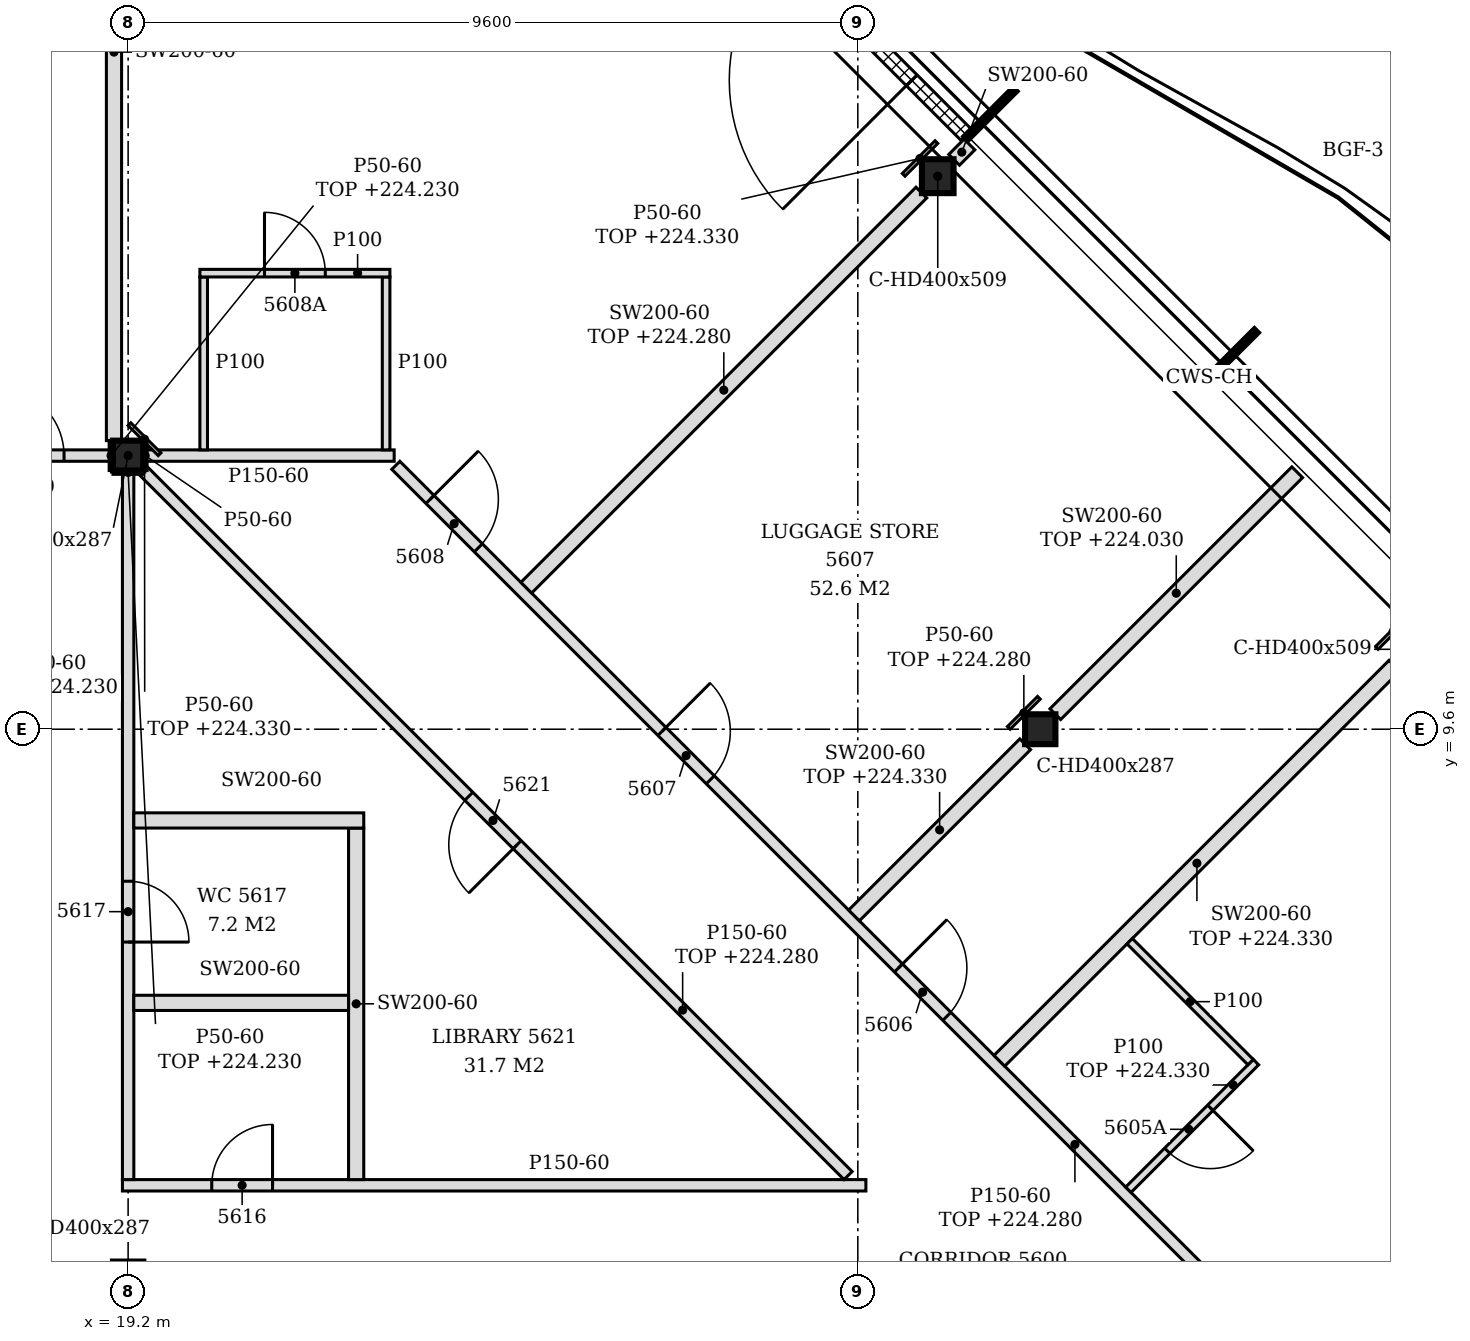
"""IFC4 building model, lengths in metres.
Left out: names, types, materials, properties, quantities, classifications, styles, units other than length and angle.
Written with IfcOpenShell. Run it as: python <this file> out.ifc"""

import sys

from ifc_helpers import new_model, si_unit, direction, frame, frame_2d, origin, origin_2d, place, context, subcontext, project, spatial, polyline, rectangle, i_section, outline, extrude, element, fill, save


model = new_model("IFC4")
c1 = context("Model", 3, precision=1e-05, world=origin(), true_north=direction((0.0, 1.0)))
c2 = subcontext(c1, "Body", "Model", "MODEL_VIEW")
j1 = project(units=[si_unit("LENGTHUNIT", "METRE"), si_unit("PLANEANGLEUNIT", "RADIAN")], contexts=[c1])
p1 = place(None, origin())
s1 = spatial("IfcSite", under=j1, at=p1, CompositionType="ELEMENT")
p2 = place(p1, origin())
s2 = spatial("IfcBuilding", under=s1, at=p2, CompositionType="ELEMENT")
p3 = place(p2, frame((0.0, 0.0, 221.4)))
s3 = spatial("IfcBuildingStorey", under=s2, at=p3, CompositionType="ELEMENT", Elevation=221.4)
p4 = place(p3, frame((29.852, 16.876, -0.15), z_axis=(0.0, 0.0, 1.0), x_axis=(1.0, 0.0, 0.0)))
e1 = element("IfcColumn", 1, at=p4, inside=s3, PredefinedType="COLUMN", context=c2, shape_type="SweptSolid", body=[
    extrude(i_section(OverallWidth=0.416, OverallDepth=0.446, WebThickness=0.039, FlangeThickness=0.063, FilletRadius=0.015, at=origin_2d()), origin(), (0.0, 0.0, 1.0), 3.6),
])
for number, where, z_axis, x_axis in (
    (2, (19.2, 13.2, -0.15), (0.0, 0.0, 1.0), (1.0, 0.0, 0.0)),
    (3, (31.2, 9.6, -0.15), (0.0, 0.0, 1.0), (1.0, 0.0, 0.0)),
):
    element("IfcColumn", number, at=place(p3, frame(where, z_axis=z_axis, x_axis=x_axis)), inside=s3, PredefinedType="COLUMN", context=c2, shape_type="SweptSolid", body=[
        extrude(i_section(OverallWidth=0.399, OverallDepth=0.393, WebThickness=0.023, FlangeThickness=0.037, FilletRadius=0.015, at=origin_2d()), origin(), (0.0, 0.0, 1.0), 3.6),
    ])
p5 = place(p3, frame((30.226, 17.42, 0.0), z_axis=(0.0, 0.0, 1.0), x_axis=(-0.707079231393, 0.707134329907, 0.0)))
e4 = element("IfcWall", 4, at=p5, inside=s3, PredefinedType="NOTDEFINED", context=c2, shape_type="SweptSolid", body=[
    extrude(rectangle(XDim=4.431, YDim=0.2, at=frame_2d((2.215, 0.0))), origin(), (0.0, 0.0, 1.0), 3.45),
])
p6 = place(p5, frame((1.015, 0.0, 0.0)))
e5 = element("IfcOpeningElement", 5, at=p6, cuts=e4, PredefinedType="OPENING", context=c2, shape_type="SweptSolid", body=[
    extrude(rectangle(XDim=2.4, YDim=2.4, at=frame_2d((1.2, 1.2))), frame((0.0, 0.11, 0.0), z_axis=(0.0, -1.0, 0.0), x_axis=(1.0, 0.0, 0.0)), (0.0, 0.0, 1.0), 0.22),
])
p7 = place(p3, frame((33.341, 2.453, 0.0), z_axis=(0.0, 0.0, 1.0), x_axis=(-0.707098652635, 0.707114909645, 0.0)))
e6 = element("IfcWall", 6, at=p7, inside=s3, PredefinedType="PARTITIONING", context=c2, shape_type="SweptSolid", body=[
    extrude(rectangle(XDim=15.018, YDim=0.15, at=frame_2d((7.509, 0.0))), origin(), (0.0, 0.0, 1.0), 2.88),
])
p8 = place(p7, frame((4.766, 0.0, 0.0)))
e7 = element("IfcOpeningElement", 7, at=p8, cuts=e6, PredefinedType="OPENING", context=c2, shape_type="SweptSolid", body=[
    extrude(rectangle(XDim=0.9, YDim=2.1, at=frame_2d((0.45, 1.05))), frame((0.0, 0.085, 0.0), z_axis=(0.0, -1.0, 0.0), x_axis=(1.0, 0.0, 0.0)), (0.0, 0.0, 1.0), 0.17),
])
p9 = place(p7, frame((9.167, 0.0, 0.0)))
e8 = element("IfcOpeningElement", 8, at=p9, cuts=e6, PredefinedType="OPENING", context=c2, shape_type="SweptSolid", body=[
    extrude(rectangle(XDim=0.9, YDim=2.1, at=frame_2d((0.45, 1.05))), frame((0.0, 0.085, 0.0), z_axis=(0.0, -1.0, 0.0), x_axis=(1.0, 0.0, 0.0)), (0.0, 0.0, 1.0), 0.17),
])
p10 = place(p7, frame((13.482, 0.0, 0.0)))
e9 = element("IfcOpeningElement", 9, at=p10, cuts=e6, PredefinedType="OPENING", context=c2, shape_type="SweptSolid", body=[
    extrude(rectangle(XDim=0.9, YDim=2.1, at=frame_2d((0.45, 1.05))), frame((0.0, 0.085, 0.0), z_axis=(0.0, -1.0, 0.0), x_axis=(1.0, 0.0, 0.0)), (0.0, 0.0, 1.0), 0.17),
])
p11 = place(p3, frame((32.359, 3.541, 0.0), z_axis=(0.0, 0.0, 1.0), x_axis=(0.707158179099, 0.707055379538, 0.0)))
e10 = element("IfcWall", 10, at=p11, inside=s3, PredefinedType="PARTITIONING", context=c2, shape_type="SweptSolid", body=[
    extrude(rectangle(XDim=2.375, YDim=0.1, at=frame_2d((1.188, 0.0))), origin(), (0.0, 0.0, 1.0), 2.93),
])
p12 = place(p11, frame((0.725, 0.0, 0.0)))
e11 = element("IfcOpeningElement", 11, at=p12, cuts=e10, PredefinedType="OPENING", context=c2, shape_type="SweptSolid", body=[
    extrude(rectangle(XDim=0.8, YDim=2.1, at=frame_2d((0.4, 1.05))), frame((0.0, 0.06, 0.0), z_axis=(0.0, -1.0, 0.0), x_axis=(1.0, 0.0, 0.0)), (0.0, 0.0, 1.0), 0.12),
])
p13 = place(p3, frame((19.125, 3.6, 0.0), z_axis=(0.0, 0.0, 1.0), x_axis=(1.0, 0.0, 0.0)))
e12 = element("IfcWall", 12, at=p13, inside=s3, PredefinedType="PARTITIONING", context=c2, shape_type="SweptSolid", body=[
    extrude(outline(polyline([(0.0, 0.0), (9.781, 0.0), (9.781, 3.45), (0.225, 3.45), (0.223, 2.83), (0.0, 2.83), (0.0, 0.0)])), frame((0.0, 0.075, 0.0), z_axis=(0.0, -1.0, 0.0), x_axis=(1.0, 0.0, 0.0)), (0.0, 0.0, 1.0), 0.15),
])
p14 = place(p13, frame((1.175, 0.0, 0.0)))
e13 = element("IfcOpeningElement", 13, at=p14, cuts=e12, PredefinedType="OPENING", context=c2, shape_type="SweptSolid", body=[
    extrude(rectangle(XDim=0.8, YDim=2.1, at=frame_2d((0.4, 1.05))), frame((0.0, 0.085, 0.0), z_axis=(0.0, -1.0, 0.0), x_axis=(1.0, 0.0, 0.0)), (0.0, 0.0, 1.0), 0.17),
])
p15 = place(p3, frame((19.2, 3.675, 0.0), z_axis=(0.0, 0.0, 1.0), x_axis=(0.0, 1.0, 0.0)))
e14 = element("IfcWall", 14, at=p15, inside=s3, PredefinedType="PARTITIONING", context=c2, shape_type="SweptSolid", body=[
    extrude(rectangle(XDim=9.328, YDim=0.15, at=frame_2d((4.664, 0.0))), origin(), (0.0, 0.0, 1.0), 2.83),
])
p16 = place(p15, frame((3.125, 0.0, 0.0)))
e15 = element("IfcOpeningElement", 15, at=p16, cuts=e14, PredefinedType="OPENING", context=c2, shape_type="SweptSolid", body=[
    extrude(rectangle(XDim=0.8, YDim=2.1, at=frame_2d((0.4, 1.05))), frame((0.0, 0.085, 0.0), z_axis=(0.0, -1.0, 0.0), x_axis=(1.0, 0.0, 0.0)), (0.0, 0.0, 1.0), 0.17),
])
p17 = place(p3, frame((22.2, 3.675, 0.0), z_axis=(0.0, 0.0, 1.0), x_axis=(0.0, 1.0, 0.0)))
e16 = element("IfcWall", 16, at=p17, inside=s3, PredefinedType="PARTITIONING", context=c2, shape_type="SweptSolid", body=[
    extrude(outline(polyline([(0.0, 0.0), (4.625, 0.0), (4.625, 3.45), (1.23, 3.45), (1.228, 2.88), (1.02, 2.88), (1.018, 3.45), (0.0, 3.45), (0.0, 0.0)])), frame((0.0, 0.1, 0.0), z_axis=(0.0, -1.0, 0.0), x_axis=(1.0, 0.0, 0.0)), (0.0, 0.0, 1.0), 0.2),
])
p18 = place(p3, frame((28.672, 3.728, 0.0), z_axis=(0.0, 0.0, 1.0), x_axis=(-0.707116088468, 0.707097473782, 0.0)))
e17 = element("IfcWall", 17, at=p18, inside=s3, PredefinedType="PARTITIONING", context=c2, shape_type="SweptSolid", body=[
    extrude(rectangle(XDim=13.115, YDim=0.15, at=frame_2d((6.558, 0.0))), origin(), (0.0, 0.0, 1.0), 2.88),
])
p19 = place(p18, frame((6.157, 0.0, 0.0)))
e18 = element("IfcOpeningElement", 18, at=p19, cuts=e17, PredefinedType="OPENING", context=c2, shape_type="SweptSolid", body=[
    extrude(rectangle(XDim=0.9, YDim=2.1, at=frame_2d((0.45, 1.05))), frame((0.0, 0.085, 0.0), z_axis=(0.0, -1.0, 0.0), x_axis=(1.0, 0.0, 0.0)), (0.0, 0.0, 1.0), 0.17),
])
p20 = place(p3, frame((30.662, 5.238, 0.0), z_axis=(0.0, 0.0, 1.0), x_axis=(0.707106781187, 0.707106781187, 0.0)))
e19 = element("IfcWall", 19, at=p20, inside=s3, PredefinedType="PARTITIONING", context=c2, shape_type="SweptSolid", body=[
    extrude(rectangle(XDim=7.351, YDim=0.2, at=frame_2d((3.676, 0.0))), origin(), (0.0, 0.0, 1.0), 2.93),
])
p21 = place(p3, frame((33.968, 5.22, 0.0), z_axis=(0.0, 0.0, 1.0), x_axis=(-0.707106781187, 0.707106781187, 0.0)))
e20 = element("IfcWall", 20, at=p21, inside=s3, PredefinedType="PARTITIONING", context=c2, shape_type="SweptSolid", body=[
    extrude(rectangle(XDim=2.25, YDim=0.1, at=frame_2d((1.125, 0.0))), origin(), (0.0, 0.0, 1.0), 3.45),
])
p22 = place(p3, frame((19.275, 6.0, 0.0), z_axis=(0.0, 0.0, 1.0), x_axis=(1.0, 0.0, 0.0)))
e21 = element("IfcWall", 21, at=p22, inside=s3, PredefinedType="PARTITIONING", context=c2, shape_type="SweptSolid", body=[
    extrude(outline(polyline([(0.0, 0.0), (2.825, 0.0), (2.825, 3.45), (0.075, 3.45), (0.073, 2.83), (0.0, 2.83), (0.0, 0.0)])), frame((0.0, 0.1, 0.0), z_axis=(0.0, -1.0, 0.0), x_axis=(1.0, 0.0, 0.0)), (0.0, 0.0, 1.0), 0.2),
])
p23 = place(p3, frame((28.75, 7.15, 0.0), z_axis=(0.0, 0.0, 1.0), x_axis=(0.7070684525, 0.707145107796, 0.0)))
e22 = element("IfcWall", 22, at=p23, inside=s3, PredefinedType="PARTITIONING", context=c2, shape_type="SweptSolid", body=[
    extrude(rectangle(XDim=3.185, YDim=0.2, at=frame_2d((1.592, 0.0))), origin(), (0.0, 0.0, 1.0), 2.93),
])
p24 = place(p3, frame((19.275, 8.4, 0.0), z_axis=(0.0, 0.0, 1.0), x_axis=(1.0, 0.0, 0.0)))
e23 = element("IfcWall", 23, at=p24, inside=s3, PredefinedType="PARTITIONING", context=c2, shape_type="SweptSolid", body=[
    extrude(outline(polyline([(0.0, 0.0), (3.025, 0.0), (3.025, 3.45), (0.075, 3.45), (0.073, 2.83), (0.0, 2.83), (0.0, 0.0)])), frame((0.0, 0.1, 0.0), z_axis=(0.0, -1.0, 0.0), x_axis=(1.0, 0.0, 0.0)), (0.0, 0.0, 1.0), 0.2),
])
p25 = place(p3, frame((31.398, 9.798, 0.0), z_axis=(0.0, 0.0, 1.0), x_axis=(0.707133900936, 0.707079660397, 0.0)))
e24 = element("IfcWall", 24, at=p25, inside=s3, PredefinedType="PARTITIONING", context=c2, shape_type="SweptSolid", body=[
    extrude(rectangle(XDim=4.501, YDim=0.2, at=frame_2d((2.25, 0.0))), origin(), (0.0, 0.0, 1.0), 2.63),
])
p26 = place(p3, frame((24.438, 11.462, 0.0), z_axis=(0.0, 0.0, 1.0), x_axis=(0.707090175614, 0.707123386369, 0.0)))
e25 = element("IfcWall", 25, at=p26, inside=s3, PredefinedType="PARTITIONING", context=c2, shape_type="SweptSolid", body=[
    extrude(rectangle(XDim=7.351, YDim=0.2, at=frame_2d((3.676, 0.0))), origin(), (0.0, 0.0, 1.0), 2.88),
])
p27 = place(p3, frame((7.399, 13.2, 0.0), z_axis=(0.0, 0.0, 1.0), x_axis=(1.0, 0.0, 0.0)))
e26 = element("IfcWall", 26, at=p27, inside=s3, PredefinedType="PARTITIONING", context=c2, shape_type="SweptSolid", body=[
    extrude(rectangle(XDim=11.601, YDim=0.15, at=frame_2d((5.801, 0.0))), origin(), (0.0, 0.0, 1.0), 2.83),
])
p28 = place(p27, frame((10.058, 0.0, 0.0)))
e27 = element("IfcOpeningElement", 27, at=p28, cuts=e26, PredefinedType="OPENING", context=c2, shape_type="SweptSolid", body=[
    extrude(rectangle(XDim=0.9, YDim=2.1, at=frame_2d((0.45, 1.05))), frame((0.0, 0.085, 0.0), z_axis=(0.0, -1.0, 0.0), x_axis=(1.0, 0.0, 0.0)), (0.0, 0.0, 1.0), 0.17),
])
p29 = place(p3, frame((19.399, 13.2, 0.0), z_axis=(0.0, 0.0, 1.0), x_axis=(1.0, 0.0, 0.0)))
e28 = element("IfcWall", 28, at=p29, inside=s3, PredefinedType="PARTITIONING", context=c2, shape_type="SweptSolid", body=[
    extrude(rectangle(XDim=3.301, YDim=0.15, at=frame_2d((1.65, 0.0))), origin(), (0.0, 0.0, 1.0), 3.45),
])
for number, where, z_axis, x_axis in (
    (29, (20.194, 13.275, 0.0), (0.0, 0.0, 1.0), (0.0, 1.0, 0.0)),
    (30, (22.594, 13.275, 0.0), (0.0, 0.0, 1.0), (0.0, 1.0, 0.0)),
):
    element("IfcWall", number, at=place(p3, frame(where, z_axis=z_axis, x_axis=x_axis)), inside=s3, PredefinedType="PARTITIONING", context=c2, shape_type="SweptSolid", body=[
        extrude(outline(polyline([(0.0, 0.0), (2.275, 0.0), (2.275, 3.45), (1.23, 3.45), (1.228, 2.88), (1.02, 2.88), (1.018, 3.45), (0.0, 3.45), (0.0, 0.0)])), frame((0.0, 0.05, 0.0), z_axis=(0.0, -1.0, 0.0), x_axis=(1.0, 0.0, 0.0)), (0.0, 0.0, 1.0), 0.1),
    ])
p30 = place(p3, frame((19.014, 13.396, 0.0), z_axis=(0.0, 0.0, 1.0), x_axis=(0.0, 1.0, 0.0)))
e31 = element("IfcWall", 31, at=p30, inside=s3, PredefinedType="PARTITIONING", context=c2, shape_type="SweptSolid", body=[
    extrude(outline(polyline([(0.0, 0.0), (10.224, 0.0), (10.223, 3.45), (9.854, 3.45), (9.852, 2.93), (5.908, 2.93), (5.906, 2.88), (5.698, 2.88), (5.697, 2.93), (0.003, 2.93), (0.001, 3.45), (0.0, 3.45), (0.0, 0.0)])), frame((0.0, 0.1, 0.0), z_axis=(0.0, -1.0, 0.0), x_axis=(1.0, 0.0, 0.0)), (0.0, 0.0, 1.0), 0.2),
])
p31 = place(p3, frame((20.144, 15.6, 0.0), z_axis=(0.0, 0.0, 1.0), x_axis=(1.0, 0.0, 0.0)))
e32 = element("IfcWall", 32, at=p31, inside=s3, PredefinedType="PARTITIONING", context=c2, shape_type="SweptSolid", body=[
    extrude(rectangle(XDim=2.5, YDim=0.1, at=frame_2d((1.25, 0.0))), origin(), (0.0, 0.0, 1.0), 3.45),
])
p32 = place(p31, frame((0.85, 0.0, 0.0)))
e33 = element("IfcOpeningElement", 33, at=p32, cuts=e32, PredefinedType="OPENING", context=c2, shape_type="SweptSolid", body=[
    extrude(rectangle(XDim=0.8, YDim=2.1, at=frame_2d((0.4, 1.05))), frame((0.0, 0.06, 0.0), z_axis=(0.0, -1.0, 0.0), x_axis=(1.0, 0.0, 0.0)), (0.0, 0.0, 1.0), 0.12),
])
p33 = place(p3, frame((30.067, 17.091, 0.0), z_axis=(0.0, 0.0, 1.0), x_axis=(0.707106781187, 0.707106781187, 0.0)))
e34 = element("IfcWall", 34, at=p33, inside=s3, PredefinedType="PARTITIONING", context=c2, shape_type="SweptSolid", body=[
    extrude(rectangle(XDim=0.285, YDim=0.2, at=frame_2d((0.143, 0.0))), origin(), (0.0, 0.0, 1.0), 3.45),
])
p34 = place(p3, frame((18.976, 13.003, 0.0), z_axis=(0.0, 0.0, 1.0), x_axis=(0.0, 1.0, 0.0)))
e35 = element("IfcWall", 35, at=p34, inside=s3, PredefinedType="PARTITIONING", context=c2, shape_type="SweptSolid", body=[
    extrude(rectangle(XDim=0.393, YDim=0.05, at=frame_2d((0.197, 0.0))), origin(), (0.0, 0.0, 1.0), 2.83),
])
p35 = place(p3, frame((19.614, 13.218, 0.0), z_axis=(0.0, 0.0, 1.0), x_axis=(-0.707106781187, 0.707106781187, 0.0)))
e36 = element("IfcWall", 36, at=p35, inside=s3, PredefinedType="PARTITIONING", context=c2, shape_type="SweptSolid", body=[
    extrude(rectangle(XDim=0.56, YDim=0.05, at=frame_2d((0.28, 0.0))), origin(), (0.0, 0.0, 1.0), 2.93),
])
p36 = place(p3, frame((35.627, 10.669, 0.0), z_axis=(0.0, 0.0, 1.0), x_axis=(0.707307009627, 0.706906496032, 0.0)))
e37 = element("IfcWall", 37, at=p36, inside=s3, PredefinedType="PARTITIONING", context=c2, shape_type="SweptSolid", body=[
    extrude(rectangle(XDim=0.61, YDim=0.05, at=frame_2d((0.305, 0.0))), origin(), (0.0, 0.0, 1.0), 2.63),
])
p37 = place(p3, frame((30.786, 9.618, 0.0), z_axis=(0.0, 0.0, 1.0), x_axis=(0.707106781187, 0.707106781187, 0.0)))
e38 = element("IfcWall", 38, at=p37, inside=s3, PredefinedType="PARTITIONING", context=c2, shape_type="SweptSolid", body=[
    extrude(rectangle(XDim=0.56, YDim=0.05, at=frame_2d((0.28, 0.0))), origin(), (0.0, 0.0, 1.0), 2.88),
])
p38 = place(p3, frame((29.403, 16.893, 0.0), z_axis=(0.0, 0.0, 1.0), x_axis=(0.706906496032, 0.707307009627, 0.0)))
e39 = element("IfcWall", 39, at=p38, inside=s3, PredefinedType="PARTITIONING", context=c2, shape_type="SweptSolid", body=[
    extrude(rectangle(XDim=0.61, YDim=0.05, at=frame_2d((0.305, 0.0))), origin(), (0.0, 0.0, 1.0), 2.93),
])
p39 = place(p3, frame((19.0, 12.979, 0.0), z_axis=(0.0, 0.0, 1.0), x_axis=(1.0, 0.0, 0.0)))
e40 = element("IfcWall", 40, at=p39, inside=s3, PredefinedType="PARTITIONING", context=c2, shape_type="SweptSolid", body=[
    extrude(rectangle(XDim=0.399, YDim=0.05, at=frame_2d((0.199, 0.0))), origin(), (0.0, 0.0, 1.0), 2.83),
])
p40 = place(p3, frame((19.425, 13.003, 0.0), z_axis=(0.0, 0.0, 1.0), x_axis=(0.0, 1.0, 0.0)))
e41 = element("IfcWall", 41, at=p40, inside=s3, PredefinedType="PARTITIONING", context=c2, shape_type="SweptSolid", body=[
    extrude(rectangle(XDim=0.393, YDim=0.05, at=frame_2d((0.197, 0.0))), origin(), (0.0, 0.0, 1.0), 3.45),
])
p41 = place(p6, origin())
e42 = element("IfcDoor", 42, at=p41, inside=s3, OperationType="SINGLE_SWING_LEFT", PredefinedType="DOOR", context=c2, shape_type="SweptSolid", body=[
    extrude(rectangle(XDim=2.4, YDim=2.4, at=frame_2d((1.2, 1.2))), frame((0.0, 0.025, 0.0), z_axis=(0.0, -1.0, 0.0), x_axis=(1.0, 0.0, 0.0)), (0.0, 0.0, 1.0), 0.05),
])
fill(e5, e42)
p42 = place(p12, frame((0.8, 0.0, 0.0), z_axis=(0.0, 0.0, 1.0), x_axis=(-1.0, 0.0, 0.0)))
e43 = element("IfcDoor", 43, at=p42, inside=s3, OperationType="SINGLE_SWING_LEFT", PredefinedType="DOOR", context=c2, shape_type="SweptSolid", body=[
    extrude(rectangle(XDim=0.8, YDim=2.1, at=frame_2d((0.4, 1.05))), frame((0.0, 0.025, 0.0), z_axis=(0.0, -1.0, 0.0), x_axis=(1.0, 0.0, 0.0)), (0.0, 0.0, 1.0), 0.05),
])
fill(e11, e43)
p43 = place(p8, frame((0.9, 0.0, 0.0), z_axis=(0.0, 0.0, 1.0), x_axis=(-1.0, 0.0, 0.0)))
e44 = element("IfcDoor", 44, at=p43, inside=s3, OperationType="SINGLE_SWING_LEFT", PredefinedType="DOOR", context=c2, shape_type="SweptSolid", body=[
    extrude(rectangle(XDim=0.9, YDim=2.1, at=frame_2d((0.45, 1.05))), frame((0.0, 0.025, 0.0), z_axis=(0.0, -1.0, 0.0), x_axis=(1.0, 0.0, 0.0)), (0.0, 0.0, 1.0), 0.05),
])
fill(e7, e44)
p44 = place(p9, frame((0.9, 0.0, 0.0), z_axis=(0.0, 0.0, 1.0), x_axis=(-1.0, 0.0, 0.0)))
e45 = element("IfcDoor", 45, at=p44, inside=s3, OperationType="SINGLE_SWING_LEFT", PredefinedType="DOOR", context=c2, shape_type="SweptSolid", body=[
    extrude(rectangle(XDim=0.9, YDim=2.1, at=frame_2d((0.45, 1.05))), frame((0.0, 0.025, 0.0), z_axis=(0.0, -1.0, 0.0), x_axis=(1.0, 0.0, 0.0)), (0.0, 0.0, 1.0), 0.05),
])
fill(e8, e45)
p45 = place(p10, frame((0.9, 0.0, 0.0), z_axis=(0.0, 0.0, 1.0), x_axis=(-1.0, 0.0, 0.0)))
e46 = element("IfcDoor", 46, at=p45, inside=s3, OperationType="SINGLE_SWING_LEFT", PredefinedType="DOOR", context=c2, shape_type="SweptSolid", body=[
    extrude(rectangle(XDim=0.9, YDim=2.1, at=frame_2d((0.45, 1.05))), frame((0.0, 0.025, 0.0), z_axis=(0.0, -1.0, 0.0), x_axis=(1.0, 0.0, 0.0)), (0.0, 0.0, 1.0), 0.05),
])
fill(e9, e46)
p46 = place(p32, origin())
e47 = element("IfcDoor", 47, at=p46, inside=s3, OperationType="SINGLE_SWING_LEFT", PredefinedType="DOOR", context=c2, shape_type="SweptSolid", body=[
    extrude(rectangle(XDim=0.8, YDim=2.1, at=frame_2d((0.4, 1.05))), frame((0.0, 0.025, 0.0), z_axis=(0.0, -1.0, 0.0), x_axis=(1.0, 0.0, 0.0)), (0.0, 0.0, 1.0), 0.05),
])
fill(e33, e47)
p47 = place(p28, origin())
e48 = element("IfcDoor", 48, at=p47, inside=s3, OperationType="SINGLE_SWING_LEFT", PredefinedType="DOOR", context=c2, shape_type="SweptSolid", body=[
    extrude(rectangle(XDim=0.9, YDim=2.1, at=frame_2d((0.45, 1.05))), frame((0.0, 0.025, 0.0), z_axis=(0.0, -1.0, 0.0), x_axis=(1.0, 0.0, 0.0)), (0.0, 0.0, 1.0), 0.05),
])
fill(e27, e48)
p48 = place(p14, origin())
e49 = element("IfcDoor", 49, at=p48, inside=s3, OperationType="SINGLE_SWING_RIGHT", PredefinedType="DOOR", context=c2, shape_type="SweptSolid", body=[
    extrude(rectangle(XDim=0.8, YDim=2.1, at=frame_2d((0.4, 1.05))), frame((0.0, 0.025, 0.0), z_axis=(0.0, -1.0, 0.0), x_axis=(1.0, 0.0, 0.0)), (0.0, 0.0, 1.0), 0.05),
])
fill(e13, e49)
p49 = place(p16, frame((0.8, 0.0, 0.0), z_axis=(0.0, 0.0, 1.0), x_axis=(-1.0, 0.0, 0.0)))
e50 = element("IfcDoor", 50, at=p49, inside=s3, OperationType="SINGLE_SWING_RIGHT", PredefinedType="DOOR", context=c2, shape_type="SweptSolid", body=[
    extrude(rectangle(XDim=0.8, YDim=2.1, at=frame_2d((0.4, 1.05))), frame((0.0, 0.025, 0.0), z_axis=(0.0, -1.0, 0.0), x_axis=(1.0, 0.0, 0.0)), (0.0, 0.0, 1.0), 0.05),
])
fill(e15, e50)
p50 = place(p19, origin())
e51 = element("IfcDoor", 51, at=p50, inside=s3, OperationType="SINGLE_SWING_LEFT", PredefinedType="DOOR", context=c2, shape_type="SweptSolid", body=[
    extrude(rectangle(XDim=0.9, YDim=2.1, at=frame_2d((0.45, 1.05))), frame((0.0, 0.025, 0.0), z_axis=(0.0, -1.0, 0.0), x_axis=(1.0, 0.0, 0.0)), (0.0, 0.0, 1.0), 0.05),
])
fill(e18, e51)
save(model, sys.argv[1])
